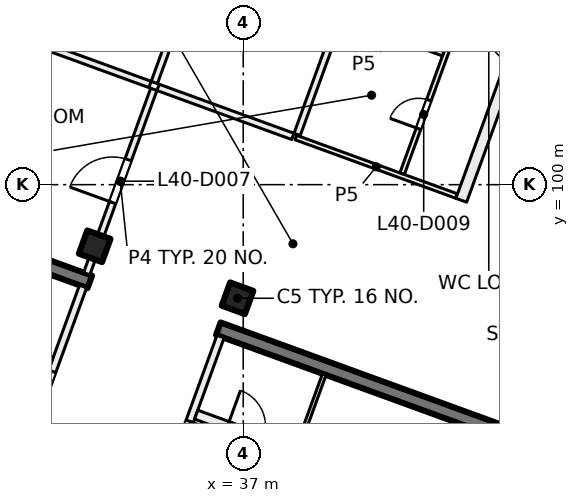
"""IFC4 building model, lengths in metres.
Left out: names, types, materials, properties, quantities, classifications, styles, units other than length and angle.
Written with IfcOpenShell. Run it as: python <this file> out.ifc"""

import sys

from ifc_helpers import new_model, si_unit, direction, frame, frame_2d, origin, origin_2d, place, context, subcontext, project, spatial, rectangle, extrude, element, fill, save


model = new_model("IFC4")
c1 = context("Model", 3, precision=1e-05, world=origin(), true_north=direction((0.0, 1.0)))
c2 = subcontext(c1, "Body", "Model", "MODEL_VIEW")
j1 = project(units=[si_unit("LENGTHUNIT", "METRE"), si_unit("PLANEANGLEUNIT", "RADIAN")], contexts=[c1])
p1 = place(None, origin())
s1 = spatial("IfcSite", under=j1, at=p1, CompositionType="ELEMENT")
p2 = place(p1, origin())
s2 = spatial("IfcBuilding", under=s1, at=p2, CompositionType="ELEMENT")
p3 = place(p2, frame((0.0, 0.0, 170.5)))
s3 = spatial("IfcBuildingStorey", under=s2, at=p3, CompositionType="ELEMENT", Elevation=170.5)
for number, where, z_axis, x_axis in (
    (1, (36.849, 97.011, 0.0), (0.0, 0.0, 1.0), (-0.342, -0.94, 0.0)),
    (2, (33.091, 98.379, 0.0), (0.0, 0.0, 1.0), (-0.342, -0.94, 0.0)),
):
    element("IfcColumn", number, at=place(p3, frame(where, z_axis=z_axis, x_axis=x_axis)), inside=s3, PredefinedType="COLUMN", context=c2, shape_type="SweptSolid", body=[
        extrude(rectangle(XDim=0.65, YDim=0.65, at=origin_2d()), origin(), (0.0, 0.0, 1.0), 4.0),
    ])
p4 = place(p3, frame((41.85, 85.241, 0.0), z_axis=(0.0, 0.0, 1.0), x_axis=(0.34201902012, 0.939693029598, 0.0)))
e3 = element("IfcWall", 3, at=p4, inside=s3, PredefinedType="SHEAR", context=c2, shape_type="SweptSolid", body=[
    extrude(rectangle(XDim=8.95, YDim=0.55, at=frame_2d((4.475, 0.0))), origin(), (0.0, 0.0, 1.0), 4.0),
])
p5 = place(p3, frame((44.473, 93.251, 0.0), z_axis=(0.0, 0.0, 1.0), x_axis=(-0.939692847377, 0.34201952077, 0.0)))
e4 = element("IfcWall", 4, at=p5, inside=s3, PredefinedType="SHEAR", context=c2, shape_type="SweptSolid", body=[
    extrude(rectangle(XDim=8.65, YDim=0.35, at=frame_2d((4.325, 0.0))), origin(), (0.0, 0.0, 1.0), 4.0),
])
p6 = place(p3, frame((32.962, 97.441, 0.0), z_axis=(0.0, 0.0, 1.0), x_axis=(-0.939689545667, 0.342028592028, 0.0)))
e5 = element("IfcWall", 5, at=p6, inside=s3, PredefinedType="SHEAR", context=c2, shape_type="SweptSolid", body=[
    extrude(rectangle(XDim=8.65, YDim=0.35, at=frame_2d((4.325, 0.0))), origin(), (0.0, 0.0, 1.0), 4.0),
])
p7 = place(p3, frame((24.666, 100.669, 0.0), z_axis=(0.0, 0.0, 1.0), x_axis=(0.34201964167, 0.939692803373, 0.0)))
e6 = element("IfcWall", 6, at=p7, inside=s3, PredefinedType="SOLIDWALL", context=c2, shape_type="SweptSolid", body=[
    extrude(rectangle(XDim=32.884, YDim=0.6, at=frame_2d((16.442, 0.0))), origin(), (0.0, 0.0, 1.0), 3.625),
])
p8 = place(p7, frame((1.48, 0.0, 0.9)))
e7 = element("IfcOpeningElement", 7, at=p8, cuts=e6, PredefinedType="OPENING", context=c2, shape_type="SweptSolid", body=[
    extrude(rectangle(XDim=3.0, YDim=2.4, at=frame_2d((1.5, 1.2))), frame((0.0, 0.31, 0.0), z_axis=(0.0, -1.0, 0.0), x_axis=(1.0, 0.0, 0.0)), (0.0, 0.0, 1.0), 0.62),
])
p9 = place(p7, frame((5.98, 0.0, 0.9)))
e8 = element("IfcOpeningElement", 8, at=p9, cuts=e6, PredefinedType="OPENING", context=c2, shape_type="SweptSolid", body=[
    extrude(rectangle(XDim=3.0, YDim=2.4, at=frame_2d((1.5, 1.2))), frame((0.0, 0.31, 0.0), z_axis=(0.0, -1.0, 0.0), x_axis=(1.0, 0.0, 0.0)), (0.0, 0.0, 1.0), 0.62),
])
p10 = place(p7, frame((10.48, 0.0, 0.9)))
e9 = element("IfcOpeningElement", 9, at=p10, cuts=e6, PredefinedType="OPENING", context=c2, shape_type="SweptSolid", body=[
    extrude(rectangle(XDim=3.0, YDim=2.4, at=frame_2d((1.5, 1.2))), frame((0.0, 0.31, 0.0), z_axis=(0.0, -1.0, 0.0), x_axis=(1.0, 0.0, 0.0)), (0.0, 0.0, 1.0), 0.62),
])
p11 = place(p7, frame((14.98, 0.0, 0.9)))
e10 = element("IfcOpeningElement", 10, at=p11, cuts=e6, PredefinedType="OPENING", context=c2, shape_type="SweptSolid", body=[
    extrude(rectangle(XDim=3.0, YDim=2.4, at=frame_2d((1.5, 1.2))), frame((0.0, 0.31, 0.0), z_axis=(0.0, -1.0, 0.0), x_axis=(1.0, 0.0, 0.0)), (0.0, 0.0, 1.0), 0.62),
])
p12 = place(p7, frame((19.48, 0.0, 0.9)))
e11 = element("IfcOpeningElement", 11, at=p12, cuts=e6, PredefinedType="OPENING", context=c2, shape_type="SweptSolid", body=[
    extrude(rectangle(XDim=3.0, YDim=2.4, at=frame_2d((1.5, 1.2))), frame((0.0, 0.31, 0.0), z_axis=(0.0, -1.0, 0.0), x_axis=(1.0, 0.0, 0.0)), (0.0, 0.0, 1.0), 0.62),
])
p13 = place(p7, frame((23.98, 0.0, 0.9)))
e12 = element("IfcOpeningElement", 12, at=p13, cuts=e6, PredefinedType="OPENING", context=c2, shape_type="SweptSolid", body=[
    extrude(rectangle(XDim=3.0, YDim=2.4, at=frame_2d((1.5, 1.2))), frame((0.0, 0.31, 0.0), z_axis=(0.0, -1.0, 0.0), x_axis=(1.0, 0.0, 0.0)), (0.0, 0.0, 1.0), 0.62),
])
p14 = place(p7, frame((28.48, 0.0, 0.9)))
e13 = element("IfcOpeningElement", 13, at=p14, cuts=e6, PredefinedType="OPENING", context=c2, shape_type="SweptSolid", body=[
    extrude(rectangle(XDim=3.0, YDim=2.4, at=frame_2d((1.5, 1.2))), frame((0.0, 0.31, 0.0), z_axis=(0.0, -1.0, 0.0), x_axis=(1.0, 0.0, 0.0)), (0.0, 0.0, 1.0), 0.62),
])
p15 = place(p3, frame((31.459, 93.678, 0.0), z_axis=(0.0, 0.0, 1.0), x_axis=(0.341985870128, 0.939705094502, 0.0)))
e14 = element("IfcWall", 14, at=p15, inside=s3, PredefinedType="PARTITIONING", context=c2, shape_type="SweptSolid", body=[
    extrude(rectangle(XDim=3.875, YDim=0.2, at=frame_2d((1.938, 0.0))), origin(), (0.0, 0.0, 1.0), 3.625),
])
p16 = place(p15, frame((0.3, 0.0, 0.0)))
e15 = element("IfcOpeningElement", 15, at=p16, cuts=e14, PredefinedType="OPENING", context=c2, shape_type="SweptSolid", body=[
    extrude(rectangle(XDim=1.2, YDim=2.1, at=frame_2d((0.6, 1.05))), frame((0.0, 0.11, 0.0), z_axis=(0.0, -1.0, 0.0), x_axis=(1.0, 0.0, 0.0)), (0.0, 0.0, 1.0), 0.22),
])
p17 = place(p3, frame((24.039, 98.215, 0.0), z_axis=(0.0, 0.0, 1.0), x_axis=(0.939687617333, -0.342033889887, 0.0)))
e16 = element("IfcWall", 16, at=p17, inside=s3, PredefinedType="PARTITIONING", context=c2, shape_type="SweptSolid", body=[
    extrude(rectangle(XDim=8.425, YDim=0.25, at=frame_2d((4.212, 0.0))), origin(), (0.0, 0.0, 1.0), 3.625),
])
p18 = place(p17, frame((5.242, 0.0, 0.0)))
e17 = element("IfcOpeningElement", 17, at=p18, cuts=e16, PredefinedType="OPENING", context=c2, shape_type="SweptSolid", body=[
    extrude(rectangle(XDim=0.8, YDim=2.1, at=frame_2d((0.4, 1.05))), frame((0.0, 0.135, 0.0), z_axis=(0.0, -1.0, 0.0), x_axis=(1.0, 0.0, 0.0)), (0.0, 0.0, 1.0), 0.27),
])
p19 = place(p17, frame((0.98, 0.0, 0.0)))
e18 = element("IfcOpeningElement", 18, at=p19, cuts=e16, PredefinedType="OPENING", context=c2, shape_type="SweptSolid", body=[
    extrude(rectangle(XDim=0.8, YDim=2.1, at=frame_2d((0.4, 1.05))), frame((0.0, 0.135, 0.0), z_axis=(0.0, -1.0, 0.0), x_axis=(1.0, 0.0, 0.0)), (0.0, 0.0, 1.0), 0.27),
])
p20 = place(p3, frame((36.403, 96.003, 0.0), z_axis=(0.0, 0.0, 1.0), x_axis=(-0.342041503764, -0.939684845947, 0.0)))
e19 = element("IfcWall", 19, at=p20, inside=s3, PredefinedType="PARTITIONING", context=c2, shape_type="SweptSolid", body=[
    extrude(rectangle(XDim=3.875, YDim=0.2, at=frame_2d((1.938, 0.0))), origin(), (0.0, 0.0, 1.0), 3.625),
])
p21 = place(p20, frame((2.375, 0.0, 0.0)))
e20 = element("IfcOpeningElement", 20, at=p21, cuts=e19, PredefinedType="OPENING", context=c2, shape_type="SweptSolid", body=[
    extrude(rectangle(XDim=1.2, YDim=2.1, at=frame_2d((0.6, 1.05))), frame((0.0, 0.11, 0.0), z_axis=(0.0, -1.0, 0.0), x_axis=(1.0, 0.0, 0.0)), (0.0, 0.0, 1.0), 0.22),
])
p22 = place(p3, frame((35.761, 93.948, 0.0), z_axis=(0.0, 0.0, 1.0), x_axis=(0.93969693093, -0.342008301071, 0.0)))
e21 = element("IfcWall", 21, at=p22, inside=s3, PredefinedType="PARTITIONING", context=c2, shape_type="SweptSolid", body=[
    extrude(rectangle(XDim=8.425, YDim=0.25, at=frame_2d((4.212, 0.0))), origin(), (0.0, 0.0, 1.0), 3.625),
])
p23 = place(p22, frame((0.877, 0.0, 0.0)))
e22 = element("IfcOpeningElement", 22, at=p23, cuts=e21, PredefinedType="OPENING", context=c2, shape_type="SweptSolid", body=[
    extrude(rectangle(XDim=1.0, YDim=2.1, at=frame_2d((0.5, 1.05))), frame((0.0, 0.135, 0.0), z_axis=(0.0, -1.0, 0.0), x_axis=(1.0, 0.0, 0.0)), (0.0, 0.0, 1.0), 0.27),
])
p24 = place(p22, frame((5.24, 0.0, 0.0)))
e23 = element("IfcOpeningElement", 23, at=p24, cuts=e21, PredefinedType="OPENING", context=c2, shape_type="SweptSolid", body=[
    extrude(rectangle(XDim=0.8, YDim=2.1, at=frame_2d((0.4, 1.05))), frame((0.0, 0.135, 0.0), z_axis=(0.0, -1.0, 0.0), x_axis=(1.0, 0.0, 0.0)), (0.0, 0.0, 1.0), 0.27),
])
p25 = place(p3, frame((39.132, 95.009, 0.0), z_axis=(0.0, 0.0, 1.0), x_axis=(-0.342043138314, -0.939684250976, 0.0)))
e24 = element("IfcWall", 24, at=p25, inside=s3, PredefinedType="PARTITIONING", context=c2, shape_type="SweptSolid", body=[
    extrude(rectangle(XDim=2.025, YDim=0.1, at=frame_2d((1.012, 0.0))), origin(), (0.0, 0.0, 1.0), 3.625),
])
p26 = place(p3, frame((26.736, 105.48, 0.0), z_axis=(0.0, 0.0, 1.0), x_axis=(0.939705074886, -0.341985924028, 0.0)))
e25 = element("IfcWall", 25, at=p26, inside=s3, PredefinedType="PARTITIONING", context=c2, shape_type="SweptSolid", body=[
    extrude(rectangle(XDim=8.313, YDim=0.175, at=frame_2d((4.157, 0.0))), origin(), (0.0, 0.0, 1.0), 3.625),
])
p27 = place(p3, frame((32.881, 97.657, 0.0), z_axis=(0.0, 0.0, 1.0), x_axis=(0.342058204353, 0.939678766832, 0.0)))
e26 = element("IfcWall", 26, at=p27, inside=s3, PredefinedType="PARTITIONING", context=c2, shape_type="SweptSolid", body=[
    extrude(rectangle(XDim=5.163, YDim=0.175, at=frame_2d((2.581, 0.0))), origin(), (0.0, 0.0, 1.0), 3.625),
])
p28 = place(p27, frame((1.991, 0.0, 0.0)))
e27 = element("IfcOpeningElement", 27, at=p28, cuts=e26, PredefinedType="OPENING", context=c2, shape_type="SweptSolid", body=[
    extrude(rectangle(XDim=1.2, YDim=2.1, at=frame_2d((0.6, 1.05))), frame((0.0, 0.097, 0.0), z_axis=(0.0, -1.0, 0.0), x_axis=(1.0, 0.0, 0.0)), (0.0, 0.0, 1.0), 0.195),
])
p29 = place(p3, frame((34.759, 102.56, 0.0), z_axis=(0.0, 0.0, 1.0), x_axis=(0.939770757411, -0.341805388365, 0.0)))
e28 = element("IfcWall", 28, at=p29, inside=s3, PredefinedType="PARTITIONING", context=c2, shape_type="SweptSolid", body=[
    extrude(rectangle(XDim=3.774, YDim=0.175, at=frame_2d((1.887, 0.0))), origin(), (0.0, 0.0, 1.0), 3.625),
])
p30 = place(p3, frame((34.66, 102.689, 0.0), z_axis=(0.0, 0.0, 1.0), x_axis=(0.341951828534, 0.939717482524, 0.0)))
e29 = element("IfcWall", 29, at=p30, inside=s3, PredefinedType="PARTITIONING", context=c2, shape_type="SweptSolid", body=[
    extrude(rectangle(XDim=8.826, YDim=0.175, at=frame_2d((4.413, 0.0))), origin(), (0.0, 0.0, 1.0), 3.625),
])
p31 = place(p30, frame((4.813, 0.0, 0.0)))
e30 = element("IfcOpeningElement", 30, at=p31, cuts=e29, PredefinedType="OPENING", context=c2, shape_type="SweptSolid", body=[
    extrude(rectangle(XDim=1.2, YDim=2.1, at=frame_2d((0.6, 1.05))), frame((0.0, 0.097, 0.0), z_axis=(0.0, -1.0, 0.0), x_axis=(1.0, 0.0, 0.0)), (0.0, 0.0, 1.0), 0.195),
])
p32 = place(p3, frame((38.385, 101.24, 0.0), z_axis=(0.0, 0.0, 1.0), x_axis=(0.939711088937, -0.341969398235, 0.0)))
e31 = element("IfcWall", 31, at=p32, inside=s3, PredefinedType="PARTITIONING", context=c2, shape_type="SweptSolid", body=[
    extrude(rectangle(XDim=4.503, YDim=0.125, at=frame_2d((2.252, 0.0))), origin(), (0.0, 0.0, 1.0), 3.625),
])
p33 = place(p3, frame((38.418, 101.322, 0.0), z_axis=(0.0, 0.0, 1.0), x_axis=(0.342101536507, 0.939662992099, 0.0)))
e32 = element("IfcWall", 32, at=p33, inside=s3, PredefinedType="PARTITIONING", context=c2, shape_type="SweptSolid", body=[
    extrude(rectangle(XDim=8.913, YDim=0.175, at=frame_2d((4.457, 0.0))), origin(), (0.0, 0.0, 1.0), 3.625),
])
p34 = place(p3, frame((41.181, 100.29, 0.0), z_axis=(0.0, 0.0, 1.0), x_axis=(0.34222012082, 0.939619810831, 0.0)))
e33 = element("IfcWall", 33, at=p34, inside=s3, PredefinedType="PARTITIONING", context=c2, shape_type="SweptSolid", body=[
    extrude(rectangle(XDim=8.875, YDim=0.125, at=frame_2d((4.438, 0.0))), origin(), (0.0, 0.0, 1.0), 3.625),
])
p35 = place(p34, frame((1.258, 0.0, 0.0)))
e34 = element("IfcOpeningElement", 34, at=p35, cuts=e33, PredefinedType="OPENING", context=c2, shape_type="SweptSolid", body=[
    extrude(rectangle(XDim=0.8, YDim=2.1, at=frame_2d((0.4, 1.05))), frame((0.0, 0.073, 0.0), z_axis=(0.0, -1.0, 0.0), x_axis=(1.0, 0.0, 0.0)), (0.0, 0.0, 1.0), 0.145),
])
p36 = place(p34, frame((4.437, 0.0, 0.0)))
e35 = element("IfcOpeningElement", 35, at=p36, cuts=e33, PredefinedType="OPENING", context=c2, shape_type="SweptSolid", body=[
    extrude(rectangle(XDim=0.8, YDim=2.1, at=frame_2d((0.4, 1.05))), frame((0.0, 0.073, 0.0), z_axis=(0.0, -1.0, 0.0), x_axis=(1.0, 0.0, 0.0)), (0.0, 0.0, 1.0), 0.145),
])
p37 = place(p34, frame((7.116, 0.0, 0.0)))
e36 = element("IfcOpeningElement", 36, at=p37, cuts=e33, PredefinedType="OPENING", context=c2, shape_type="SweptSolid", body=[
    extrude(rectangle(XDim=1.0, YDim=2.1, at=frame_2d((0.5, 1.05))), frame((0.0, 0.073, 0.0), z_axis=(0.0, -1.0, 0.0), x_axis=(1.0, 0.0, 0.0)), (0.0, 0.0, 1.0), 0.145),
])
p38 = place(p3, frame((42.264, 103.446, 0.0), z_axis=(0.0, 0.0, 1.0), x_axis=(-0.939640574808, 0.342163104635, 0.0)))
e37 = element("IfcWall", 37, at=p38, inside=s3, PredefinedType="PARTITIONING", context=c2, shape_type="SweptSolid", body=[
    extrude(rectangle(XDim=2.8, YDim=0.125, at=frame_2d((1.4, 0.0))), origin(), (0.0, 0.0, 1.0), 3.625),
])
p39 = place(p3, frame((42.737, 99.59, 0.0), z_axis=(0.0, 0.0, 1.0), x_axis=(0.341992703977, 0.939702607438, 0.0)))
e38 = element("IfcWall", 38, at=p39, inside=s3, PredefinedType="PARTITIONING", context=c2, shape_type="SweptSolid", body=[
    extrude(rectangle(XDim=23.006, YDim=0.3, at=frame_2d((11.503, 0.0))), origin(), (0.0, 0.0, 1.0), 3.625),
])
p40 = place(p39, frame((4.062, 0.0, 0.0)))
e39 = element("IfcOpeningElement", 39, at=p40, cuts=e38, PredefinedType="OPENING", context=c2, shape_type="SweptSolid", body=[
    extrude(rectangle(XDim=1.0, YDim=2.1, at=frame_2d((0.5, 1.05))), frame((0.0, 0.16, 0.0), z_axis=(0.0, -1.0, 0.0), x_axis=(1.0, 0.0, 0.0)), (0.0, 0.0, 1.0), 0.32),
])
p41 = place(p39, frame((10.162, 0.0, 0.0)))
e40 = element("IfcOpeningElement", 40, at=p41, cuts=e38, PredefinedType="OPENING", context=c2, shape_type="SweptSolid", body=[
    extrude(rectangle(XDim=0.8, YDim=2.1, at=frame_2d((0.4, 1.05))), frame((0.0, 0.16, 0.0), z_axis=(0.0, -1.0, 0.0), x_axis=(1.0, 0.0, 0.0)), (0.0, 0.0, 1.0), 0.32),
])
p42 = place(p39, frame((13.712, 0.0, 0.0)))
e41 = element("IfcOpeningElement", 41, at=p42, cuts=e38, PredefinedType="OPENING", context=c2, shape_type="SweptSolid", body=[
    extrude(rectangle(XDim=1.2, YDim=2.1, at=frame_2d((0.6, 1.05))), frame((0.0, 0.16, 0.0), z_axis=(0.0, -1.0, 0.0), x_axis=(1.0, 0.0, 0.0)), (0.0, 0.0, 1.0), 0.32),
])
p43 = place(p39, frame((18.662, 0.0, 0.0)))
e42 = element("IfcOpeningElement", 42, at=p43, cuts=e38, PredefinedType="OPENING", context=c2, shape_type="SweptSolid", body=[
    extrude(rectangle(XDim=1.8, YDim=2.1, at=frame_2d((0.9, 1.05))), frame((0.0, 0.16, 0.0), z_axis=(0.0, -1.0, 0.0), x_axis=(1.0, 0.0, 0.0)), (0.0, 0.0, 1.0), 0.32),
])
p44 = place(p16, origin())
e43 = element("IfcDoor", 43, at=p44, inside=s3, OperationType="DOUBLE_DOOR_SINGLE_SWING", PredefinedType="DOOR", context=c2, shape_type="SweptSolid", body=[
    extrude(rectangle(XDim=1.2, YDim=2.1, at=frame_2d((0.6, 1.05))), frame((0.0, 0.025, 0.0), z_axis=(0.0, -1.0, 0.0), x_axis=(1.0, 0.0, 0.0)), (0.0, 0.0, 1.0), 0.05),
])
fill(e15, e43)
p45 = place(p21, origin())
e44 = element("IfcDoor", 44, at=p45, inside=s3, OperationType="DOUBLE_DOOR_SINGLE_SWING", PredefinedType="DOOR", context=c2, shape_type="SweptSolid", body=[
    extrude(rectangle(XDim=1.2, YDim=2.1, at=frame_2d((0.6, 1.05))), frame((0.0, 0.025, 0.0), z_axis=(0.0, -1.0, 0.0), x_axis=(1.0, 0.0, 0.0)), (0.0, 0.0, 1.0), 0.05),
])
fill(e20, e44)
p46 = place(p28, origin())
e45 = element("IfcDoor", 45, at=p46, inside=s3, OperationType="DOUBLE_DOOR_SINGLE_SWING", PredefinedType="DOOR", context=c2, shape_type="SweptSolid", body=[
    extrude(rectangle(XDim=1.2, YDim=2.1, at=frame_2d((0.6, 1.05))), frame((0.0, 0.025, 0.0), z_axis=(0.0, -1.0, 0.0), x_axis=(1.0, 0.0, 0.0)), (0.0, 0.0, 1.0), 0.05),
])
fill(e27, e45)
p47 = place(p35, origin())
e46 = element("IfcDoor", 46, at=p47, inside=s3, OperationType="SINGLE_SWING_LEFT", PredefinedType="DOOR", context=c2, shape_type="SweptSolid", body=[
    extrude(rectangle(XDim=0.8, YDim=2.1, at=frame_2d((0.4, 1.05))), frame((0.0, 0.025, 0.0), z_axis=(0.0, -1.0, 0.0), x_axis=(1.0, 0.0, 0.0)), (0.0, 0.0, 1.0), 0.05),
])
fill(e34, e46)
save(model, sys.argv[1])
